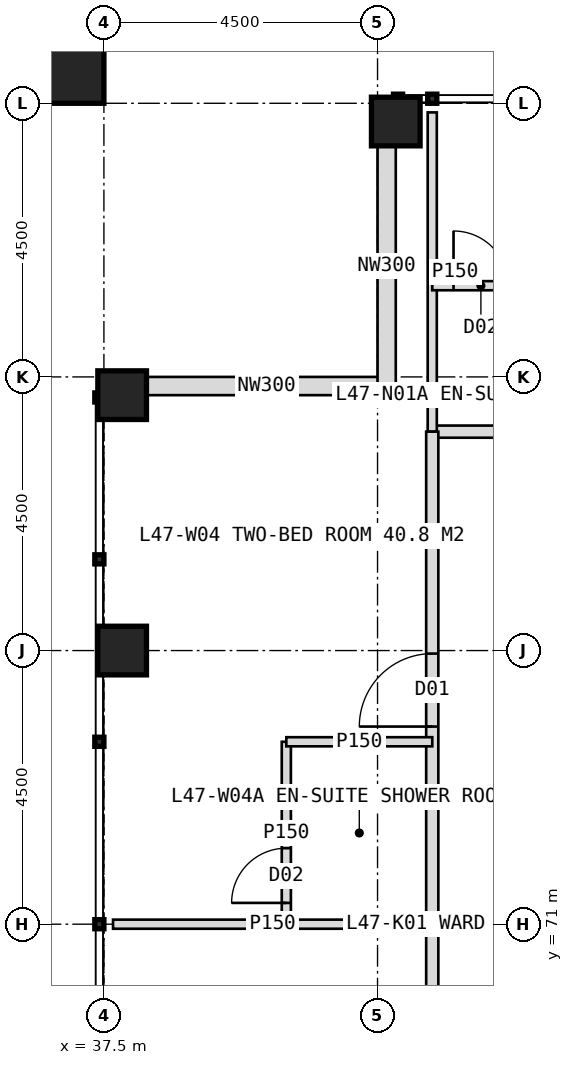
"""IFC4 building model, lengths in metres.
Left out: names, types, materials, properties, quantities, classifications, styles, units other than length and angle.
Written with IfcOpenShell. Run it as: python <this file> out.ifc"""

import sys

from ifc_helpers import new_model, si_unit, direction, frame, frame_2d, origin, origin_2d, place, context, subcontext, project, spatial, rectangle, hollow_rectangle, extrude, element, fill, save


model = new_model("IFC4")
c1 = context("Model", 3, precision=1e-05, world=origin(), true_north=direction((0.0, 1.0)))
c2 = subcontext(c1, "Body", "Model", "MODEL_VIEW")
j1 = project(units=[si_unit("LENGTHUNIT", "METRE"), si_unit("PLANEANGLEUNIT", "RADIAN")], contexts=[c1])
p1 = place(None, origin())
s1 = spatial("IfcSite", under=j1, at=p1, CompositionType="ELEMENT")
p2 = place(p1, origin())
s2 = spatial("IfcBuilding", under=s1, at=p2, CompositionType="ELEMENT")
p3 = place(p2, frame((0.0, 0.0, 197.0)))
s3 = spatial("IfcBuildingStorey", under=s2, at=p3, CompositionType="ELEMENT", Elevation=197.0)
for number, where, z_axis, x_axis in (
    (1, (42.3, 84.2, 0.0), (0.0, 0.0, 1.0), (1.0, 0.0, 0.0)),
    (2, (37.8, 75.5, 0.0), (0.0, 0.0, 1.0), (1.0, 0.0, 0.0)),
    (3, (37.8, 79.7, 0.0), (0.0, 0.0, 1.0), (1.0, 0.0, 0.0)),
):
    element("IfcColumn", number, at=place(p3, frame(where, z_axis=z_axis, x_axis=x_axis)), inside=s3, PredefinedType="COLUMN", context=c2, shape_type="SweptSolid", body=[
        extrude(hollow_rectangle(XDim=0.8, YDim=0.8, WallThickness=0.08, at=origin_2d()), origin(), (0.0, 0.0, 1.0), 4.0),
    ])
p4 = place(p3, frame((36.9, 85.1, 0.0), z_axis=(0.0, 0.0, 1.0), x_axis=(1.0, 0.0, 0.0)))
e4 = element("IfcColumn", 4, at=p4, inside=s3, PredefinedType="COLUMN", context=c2, shape_type="SweptSolid", body=[
    extrude(hollow_rectangle(XDim=1.2, YDim=1.2, WallThickness=0.07, at=origin_2d()), origin(), (0.0, 0.0, 1.0), 4.0),
])
for number, where, z_axis, x_axis in (
    (5, (38.2, 79.85, 0.0), (0.0, 0.0, 1.0), (1.0, 0.0, 0.0)),
    (6, (42.15, 79.85, 0.0), (0.0, 0.0, 1.0), (0.0, 1.0, 0.0)),
):
    element("IfcWall", number, at=place(p3, frame(where, z_axis=z_axis, x_axis=x_axis)), inside=s3, PredefinedType="ELEMENTEDWALL", context=c2, shape_type="SweptSolid", body=[
        extrude(rectangle(XDim=3.95, YDim=0.3, at=frame_2d((1.975, 0.0))), origin(), (0.0, 0.0, 1.0), 2.85),
    ])
p5 = place(p3, frame((42.9, 79.1, 0.0), z_axis=(0.0, 0.0, 1.0), x_axis=(1.0, 0.0, 0.0)))
e7 = element("IfcWall", 7, at=p5, inside=s3, PredefinedType="PARTITIONING", context=c2, shape_type="SweptSolid", body=[
    extrude(rectangle(XDim=34.2, YDim=0.2, at=frame_2d((17.1, 0.0))), origin(), (0.0, 0.0, 1.0), 3.75),
])
p6 = place(p5, frame((3.25, 0.0, 0.0)))
e8 = element("IfcOpeningElement", 8, at=p6, cuts=e7, PredefinedType="OPENING", context=c2, shape_type="SweptSolid", body=[
    extrude(rectangle(XDim=1.2, YDim=2.2, at=frame_2d((0.6, 1.1))), frame((0.0, 0.11, 0.0), z_axis=(0.0, -1.0, 0.0), x_axis=(1.0, 0.0, 0.0)), (0.0, 0.0, 1.0), 0.22),
])
p7 = place(p5, frame((10.6, 0.0, 0.0)))
e9 = element("IfcOpeningElement", 9, at=p7, cuts=e7, PredefinedType="OPENING", context=c2, shape_type="SweptSolid", body=[
    extrude(rectangle(XDim=1.0, YDim=2.1, at=frame_2d((0.5, 1.05))), frame((0.0, 0.11, 0.0), z_axis=(0.0, -1.0, 0.0), x_axis=(1.0, 0.0, 0.0)), (0.0, 0.0, 1.0), 0.22),
])
p8 = place(p5, frame((17.35, 0.0, 0.0)))
e10 = element("IfcOpeningElement", 10, at=p8, cuts=e7, PredefinedType="OPENING", context=c2, shape_type="SweptSolid", body=[
    extrude(rectangle(XDim=1.2, YDim=2.2, at=frame_2d((0.6, 1.1))), frame((0.0, 0.11, 0.0), z_axis=(0.0, -1.0, 0.0), x_axis=(1.0, 0.0, 0.0)), (0.0, 0.0, 1.0), 0.22),
])
p9 = place(p5, frame((25.75, 0.0, 0.0)))
e11 = element("IfcOpeningElement", 11, at=p9, cuts=e7, PredefinedType="OPENING", context=c2, shape_type="SweptSolid", body=[
    extrude(rectangle(XDim=1.2, YDim=2.2, at=frame_2d((0.6, 1.1))), frame((0.0, 0.11, 0.0), z_axis=(0.0, -1.0, 0.0), x_axis=(1.0, 0.0, 0.0)), (0.0, 0.0, 1.0), 0.22),
])
p10 = place(p3, frame((42.9, 79.1, 0.0), z_axis=(0.0, 0.0, 1.0), x_axis=(0.0, 1.0, 0.0)))
e12 = element("IfcWall", 12, at=p10, inside=s3, PredefinedType="PARTITIONING", context=c2, shape_type="SweptSolid", body=[
    extrude(rectangle(XDim=5.25, YDim=0.15, at=frame_2d((2.625, 0.0))), origin(), (0.0, 0.0, 1.0), 3.75),
])
p11 = place(p3, frame((42.9, 81.5, 0.0), z_axis=(0.0, 0.0, 1.0), x_axis=(1.0, 0.0, 0.0)))
e13 = element("IfcWall", 13, at=p11, inside=s3, PredefinedType="PARTITIONING", context=c2, shape_type="SweptSolid", body=[
    extrude(rectangle(XDim=3.0, YDim=0.15, at=frame_2d((1.5, 0.0))), origin(), (0.0, 0.0, 1.0), 3.75),
])
p12 = place(p11, frame((0.35, 0.0, 0.0)))
e14 = element("IfcOpeningElement", 14, at=p12, cuts=e13, PredefinedType="OPENING", context=c2, shape_type="SweptSolid", body=[
    extrude(rectangle(XDim=0.9, YDim=2.1, at=frame_2d((0.45, 1.05))), frame((0.0, 0.085, 0.0), z_axis=(0.0, -1.0, 0.0), x_axis=(1.0, 0.0, 0.0)), (0.0, 0.0, 1.0), 0.17),
])
p13 = place(p3, frame((42.9, 71.0, 0.0), z_axis=(0.0, 0.0, 1.0), x_axis=(-1.0, 0.0, 0.0)))
e15 = element("IfcWall", 15, at=p13, inside=s3, PredefinedType="PARTITIONING", context=c2, shape_type="SweptSolid", body=[
    extrude(rectangle(XDim=5.25, YDim=0.15, at=frame_2d((2.625, 0.0))), origin(), (0.0, 0.0, 1.0), 3.75),
])
p14 = place(p3, frame((42.9, 44.9, 0.0), z_axis=(0.0, 0.0, 1.0), x_axis=(0.0, 1.0, 0.0)))
e16 = element("IfcWall", 16, at=p14, inside=s3, PredefinedType="PARTITIONING", context=c2, shape_type="SweptSolid", body=[
    extrude(rectangle(XDim=34.2, YDim=0.2, at=frame_2d((17.1, 0.0))), origin(), (0.0, 0.0, 1.0), 3.75),
])
p15 = place(p14, frame((3.25, 0.0, 0.0)))
e17 = element("IfcOpeningElement", 17, at=p15, cuts=e16, PredefinedType="OPENING", context=c2, shape_type="SweptSolid", body=[
    extrude(rectangle(XDim=1.2, YDim=2.2, at=frame_2d((0.6, 1.1))), frame((0.0, 0.11, 0.0), z_axis=(0.0, -1.0, 0.0), x_axis=(1.0, 0.0, 0.0)), (0.0, 0.0, 1.0), 0.22),
])
p16 = place(p14, frame((11.35, 0.0, 0.0)))
e18 = element("IfcOpeningElement", 18, at=p16, cuts=e16, PredefinedType="OPENING", context=c2, shape_type="SweptSolid", body=[
    extrude(rectangle(XDim=1.2, YDim=2.2, at=frame_2d((0.6, 1.1))), frame((0.0, 0.11, 0.0), z_axis=(0.0, -1.0, 0.0), x_axis=(1.0, 0.0, 0.0)), (0.0, 0.0, 1.0), 0.22),
])
p17 = place(p14, frame((20.35, 0.0, 0.0)))
e19 = element("IfcOpeningElement", 19, at=p17, cuts=e16, PredefinedType="OPENING", context=c2, shape_type="SweptSolid", body=[
    extrude(rectangle(XDim=1.2, YDim=2.2, at=frame_2d((0.6, 1.1))), frame((0.0, 0.11, 0.0), z_axis=(0.0, -1.0, 0.0), x_axis=(1.0, 0.0, 0.0)), (0.0, 0.0, 1.0), 0.22),
])
p18 = place(p14, frame((29.35, 0.0, 0.0)))
e20 = element("IfcOpeningElement", 20, at=p18, cuts=e16, PredefinedType="OPENING", context=c2, shape_type="SweptSolid", body=[
    extrude(rectangle(XDim=1.2, YDim=2.2, at=frame_2d((0.6, 1.1))), frame((0.0, 0.11, 0.0), z_axis=(0.0, -1.0, 0.0), x_axis=(1.0, 0.0, 0.0)), (0.0, 0.0, 1.0), 0.22),
])
p19 = place(p3, frame((40.5, 71.0, 0.0), z_axis=(0.0, 0.0, 1.0), x_axis=(0.0, 1.0, 0.0)))
e21 = element("IfcWall", 21, at=p19, inside=s3, PredefinedType="PARTITIONING", context=c2, shape_type="SweptSolid", body=[
    extrude(rectangle(XDim=3.0, YDim=0.15, at=frame_2d((1.5, 0.0))), origin(), (0.0, 0.0, 1.0), 3.75),
])
p20 = place(p19, frame((0.35, 0.0, 0.0)))
e22 = element("IfcOpeningElement", 22, at=p20, cuts=e21, PredefinedType="OPENING", context=c2, shape_type="SweptSolid", body=[
    extrude(rectangle(XDim=0.9, YDim=2.1, at=frame_2d((0.45, 1.05))), frame((0.0, 0.085, 0.0), z_axis=(0.0, -1.0, 0.0), x_axis=(1.0, 0.0, 0.0)), (0.0, 0.0, 1.0), 0.17),
])
p21 = place(p3, frame((42.9, 74.0, 0.0), z_axis=(0.0, 0.0, 1.0), x_axis=(-1.0, 0.0, 0.0)))
e23 = element("IfcWall", 23, at=p21, inside=s3, PredefinedType="PARTITIONING", context=c2, shape_type="SweptSolid", body=[
    extrude(rectangle(XDim=2.4, YDim=0.15, at=frame_2d((1.2, 0.0))), origin(), (0.0, 0.0, 1.0), 3.75),
])
p22 = place(p12, origin())
e24 = element("IfcDoor", 24, at=p22, inside=s3, OperationType="SINGLE_SWING_LEFT", PredefinedType="DOOR", context=c2, shape_type="SweptSolid", body=[
    extrude(rectangle(XDim=0.9, YDim=2.1, at=frame_2d((0.45, 1.05))), frame((0.0, 0.025, 0.0), z_axis=(0.0, -1.0, 0.0), x_axis=(1.0, 0.0, 0.0)), (0.0, 0.0, 1.0), 0.05),
])
fill(e14, e24)
p23 = place(p18, origin())
e25 = element("IfcDoor", 25, at=p23, inside=s3, OperationType="SINGLE_SWING_LEFT", PredefinedType="DOOR", context=c2, shape_type="SweptSolid", body=[
    extrude(rectangle(XDim=1.2, YDim=2.2, at=frame_2d((0.6, 1.1))), frame((0.0, 0.025, 0.0), z_axis=(0.0, -1.0, 0.0), x_axis=(1.0, 0.0, 0.0)), (0.0, 0.0, 1.0), 0.05),
])
fill(e20, e25)
p24 = place(p20, origin())
e26 = element("IfcDoor", 26, at=p24, inside=s3, OperationType="SINGLE_SWING_LEFT", PredefinedType="DOOR", context=c2, shape_type="SweptSolid", body=[
    extrude(rectangle(XDim=0.9, YDim=2.1, at=frame_2d((0.45, 1.05))), frame((0.0, 0.025, 0.0), z_axis=(0.0, -1.0, 0.0), x_axis=(1.0, 0.0, 0.0)), (0.0, 0.0, 1.0), 0.05),
])
fill(e22, e26)
save(model, sys.argv[1])
